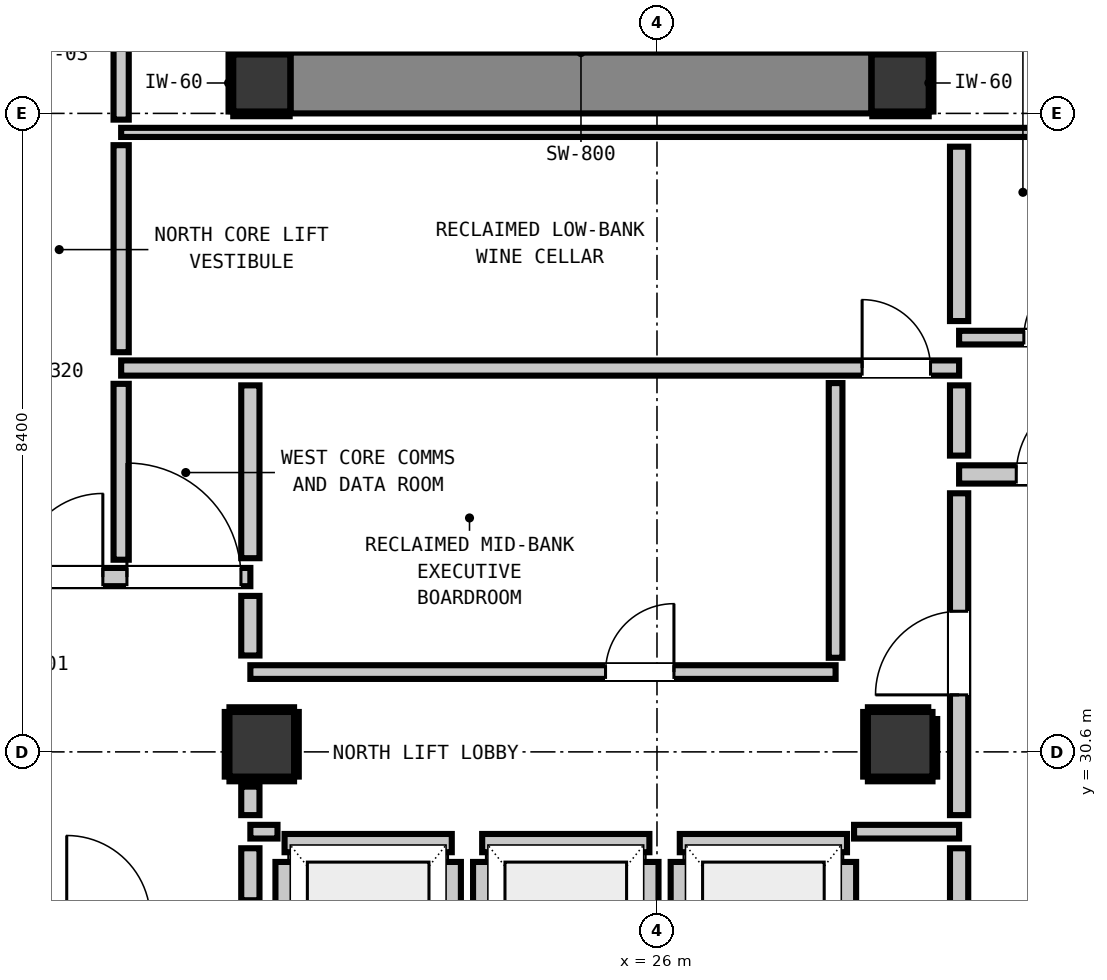
"""IFC4 building model, lengths in metres.
Left out: names, types, materials, properties, quantities, classifications, styles, units other than length and angle.
Written with IfcOpenShell. Run it as: python <this file> out.ifc"""

import sys

from ifc_helpers import new_model, si_unit, direction, frame, frame_2d, origin, origin_2d, place, context, subcontext, project, spatial, rectangle, extrude, element, fill, save


model = new_model("IFC4")
c1 = context("Model", 3, precision=1e-05, world=origin(), true_north=direction((0.0, 1.0)))
c2 = subcontext(c1, "Body", "Model", "MODEL_VIEW")
j1 = project(units=[si_unit("LENGTHUNIT", "METRE"), si_unit("PLANEANGLEUNIT", "RADIAN")], contexts=[c1])
p1 = place(None, origin())
s1 = spatial("IfcSite", under=j1, at=p1, CompositionType="ELEMENT")
p2 = place(p1, origin())
s2 = spatial("IfcBuilding", under=s1, at=p2, CompositionType="ELEMENT")
p3 = place(p2, frame((0.0, 0.0, 210.08)))
s3 = spatial("IfcBuildingStorey", under=s2, at=p3, CompositionType="ELEMENT", Elevation=210.08)
for number, where, z_axis, x_axis in (
    (1, (20.8, 39.4, 0.0), (0.0, 0.0, 1.0), (1.0, 0.0, 0.0)),
    (2, (29.2, 39.4, 0.0), (0.0, 0.0, 1.0), (1.0, 0.0, 0.0)),
):
    element("IfcColumn", number, at=place(p3, frame(where, z_axis=z_axis, x_axis=x_axis)), inside=s3, PredefinedType="COLUMN", context=c2, shape_type="SweptSolid", body=[
        extrude(rectangle(XDim=0.75, YDim=0.75, at=origin_2d()), origin(), (0.0, 0.0, 1.0), 3.32),
    ])
p4 = place(p3, frame((21.18, 39.4, 0.0), z_axis=(0.0, 0.0, 1.0), x_axis=(1.0, 0.0, 0.0)))
e3 = element("IfcWall", 3, at=p4, inside=s3, PredefinedType="SHEAR", context=c2, shape_type="SweptSolid", body=[
    extrude(rectangle(XDim=7.64, YDim=0.8, at=frame_2d((3.82, 0.0))), origin(), (0.0, 0.0, 1.0), 3.32),
])
for number, where, z_axis, x_axis in (
    (4, (20.8, 30.7, 0.0), (0.0, 0.0, 1.0), (1.0, 0.0, 0.0)),
    (5, (29.2, 30.7, 0.0), (0.0, 0.0, 1.0), (1.0, 0.0, 0.0)),
):
    element("IfcColumn", number, at=place(p3, frame(where, z_axis=z_axis, x_axis=x_axis)), inside=s3, PredefinedType="COLUMN", context=c2, shape_type="SweptSolid", body=[
        extrude(rectangle(XDim=0.85, YDim=0.85, at=origin_2d()), origin(), (0.0, 0.0, 1.0), 3.32),
    ])
p5 = place(p3, frame((21.1, 29.4, 0.0), z_axis=(0.0, 0.0, 1.0), x_axis=(1.0, 0.0, 0.0)))
e6 = element("IfcWall", 6, at=p5, inside=s3, PredefinedType="PARTITIONING", context=c2, shape_type="SweptSolid", body=[
    extrude(rectangle(XDim=2.2, YDim=0.24, at=frame_2d((1.1, 0.0))), origin(), (0.0, 0.0, 1.0), 3.1),
])
p6 = place(p3, frame((21.1, 27.048, 0.0), z_axis=(0.0, 0.0, 1.0), x_axis=(0.0, 1.0, 0.0)))
e7 = element("IfcWall", 7, at=p6, inside=s3, PredefinedType="PARTITIONING", context=c2, shape_type="SweptSolid", body=[
    extrude(rectangle(XDim=2.104, YDim=0.24, at=frame_2d((1.052, 0.0))), origin(), (0.0, 0.0, 1.0), 2.335),
])
p7 = place(p3, frame((23.3, 27.048, 0.0), z_axis=(0.0, 0.0, 1.0), x_axis=(0.0, 1.0, 0.0)))
e8 = element("IfcWall", 8, at=p7, inside=s3, PredefinedType="PARTITIONING", context=c2, shape_type="SweptSolid", body=[
    extrude(rectangle(XDim=2.104, YDim=0.24, at=frame_2d((1.052, 0.0))), origin(), (0.0, 0.0, 1.0), 3.1),
])
p8 = place(p3, frame((23.7, 29.4, 0.0), z_axis=(0.0, 0.0, 1.0), x_axis=(1.0, 0.0, 0.0)))
e9 = element("IfcWall", 9, at=p8, inside=s3, PredefinedType="PARTITIONING", context=c2, shape_type="SweptSolid", body=[
    extrude(rectangle(XDim=2.2, YDim=0.24, at=frame_2d((1.1, 0.0))), origin(), (0.0, 0.0, 1.0), 3.1),
])
for number, where, z_axis, x_axis in (
    (10, (23.7, 27.048, 0.0), (0.0, 0.0, 1.0), (0.0, 1.0, 0.0)),
    (11, (25.9, 27.048, 0.0), (0.0, 0.0, 1.0), (0.0, 1.0, 0.0)),
):
    element("IfcWall", number, at=place(p3, frame(where, z_axis=z_axis, x_axis=x_axis)), inside=s3, PredefinedType="PARTITIONING", context=c2, shape_type="SweptSolid", body=[
        extrude(rectangle(XDim=2.104, YDim=0.24, at=frame_2d((1.052, 0.0))), origin(), (0.0, 0.0, 1.0), 3.1),
    ])
p9 = place(p3, frame((26.3, 29.4, 0.0), z_axis=(0.0, 0.0, 1.0), x_axis=(1.0, 0.0, 0.0)))
e12 = element("IfcWall", 12, at=p9, inside=s3, PredefinedType="PARTITIONING", context=c2, shape_type="SweptSolid", body=[
    extrude(rectangle(XDim=2.2, YDim=0.24, at=frame_2d((1.1, 0.0))), origin(), (0.0, 0.0, 1.0), 3.1),
])
p10 = place(p3, frame((26.3, 27.048, 0.0), z_axis=(0.0, 0.0, 1.0), x_axis=(0.0, 1.0, 0.0)))
e13 = element("IfcWall", 13, at=p10, inside=s3, PredefinedType="PARTITIONING", context=c2, shape_type="SweptSolid", body=[
    extrude(rectangle(XDim=2.104, YDim=0.24, at=frame_2d((1.052, 0.0))), origin(), (0.0, 0.0, 1.0), 3.1),
])
p11 = place(p3, frame((28.5, 27.33, 0.0), z_axis=(0.0, 0.0, 1.0), x_axis=(0.0, 1.0, 0.0)))
e14 = element("IfcWall", 14, at=p11, inside=s3, PredefinedType="PARTITIONING", context=c2, shape_type="SweptSolid", body=[
    extrude(rectangle(XDim=1.822, YDim=0.24, at=frame_2d((0.911, 0.0))), origin(), (0.0, 0.0, 1.0), 3.1),
])
p12 = place(p3, frame((17.45, 32.9, 0.0), z_axis=(0.0, 0.0, 1.0), x_axis=(1.0, 0.0, 0.0)))
e15 = element("IfcWall", 15, at=p12, inside=s3, PredefinedType="PARTITIONING", context=c2, shape_type="SweptSolid", body=[
    extrude(rectangle(XDim=3.2, YDim=0.24, at=frame_2d((1.6, 0.0))), origin(), (0.0, 0.0, 1.0), 3.1),
])
p13 = place(p12, frame((0.159, 0.0, 0.0)))
e16 = element("IfcOpeningElement", 16, at=p13, cuts=e15, PredefinedType="OPENING", context=c2, shape_type="SweptSolid", body=[
    extrude(rectangle(XDim=1.1, YDim=2.15, at=frame_2d((0.55, 1.075))), frame((0.0, 0.13, 0.0), z_axis=(0.0, -1.0, 0.0), x_axis=(1.0, 0.0, 0.0)), (0.0, 0.0, 1.0), 0.26),
])
p14 = place(p12, frame((1.576, 0.0, 0.0)))
e17 = element("IfcOpeningElement", 17, at=p14, cuts=e15, PredefinedType="OPENING", context=c2, shape_type="SweptSolid", body=[
    extrude(rectangle(XDim=1.5, YDim=2.15, at=frame_2d((0.75, 1.075))), frame((0.0, 0.13, 0.0), z_axis=(0.0, -1.0, 0.0), x_axis=(1.0, 0.0, 0.0)), (0.0, 0.0, 1.0), 0.26),
])
p15 = place(p3, frame((29.975, 34.25, 0.0), z_axis=(0.0, 0.0, 1.0), x_axis=(1.0, 0.0, 0.0)))
e18 = element("IfcWall", 18, at=p15, inside=s3, PredefinedType="PARTITIONING", context=c2, shape_type="SweptSolid", body=[
    extrude(rectangle(XDim=2.475, YDim=0.24, at=frame_2d((1.237, 0.0))), origin(), (0.0, 0.0, 1.0), 3.1),
])
p16 = place(p15, frame((0.752, 0.0, 0.0)))
e19 = element("IfcOpeningElement", 19, at=p16, cuts=e18, PredefinedType="OPENING", context=c2, shape_type="SweptSolid", body=[
    extrude(rectangle(XDim=1.1, YDim=2.15, at=frame_2d((0.55, 1.075))), frame((0.0, 0.13, 0.0), z_axis=(0.0, -1.0, 0.0), x_axis=(1.0, 0.0, 0.0)), (0.0, 0.0, 1.0), 0.26),
])
p17 = place(p3, frame((18.95, 35.65, 0.0), z_axis=(0.0, 0.0, 1.0), x_axis=(1.0, 0.0, 0.0)))
e20 = element("IfcWall", 20, at=p17, inside=s3, PredefinedType="PARTITIONING", context=c2, shape_type="SweptSolid", body=[
    extrude(rectangle(XDim=11.025, YDim=0.2, at=frame_2d((5.513, 0.0))), origin(), (0.0, 0.0, 1.0), 3.1),
])
p18 = place(p17, frame((9.749, 0.0, 0.0)))
e21 = element("IfcOpeningElement", 21, at=p18, cuts=e20, PredefinedType="OPENING", context=c2, shape_type="SweptSolid", body=[
    extrude(rectangle(XDim=0.9, YDim=2.1, at=frame_2d((0.45, 1.05))), frame((0.0, 0.11, 0.0), z_axis=(0.0, -1.0, 0.0), x_axis=(1.0, 0.0, 0.0)), (0.0, 0.0, 1.0), 0.22),
])
p19 = place(p3, frame((20.65, 29.55, 0.0), z_axis=(0.0, 0.0, 1.0), x_axis=(1.0, 0.0, 0.0)))
e22 = element("IfcWall", 22, at=p19, inside=s3, PredefinedType="PARTITIONING", context=c2, shape_type="SweptSolid", body=[
    extrude(rectangle(XDim=0.357, YDim=0.18, at=frame_2d((0.179, 0.0))), origin(), (0.0, 0.0, 1.0), 3.1),
])
p20 = place(p3, frame((28.593, 29.55, 0.0), z_axis=(0.0, 0.0, 1.0), x_axis=(1.0, 0.0, 0.0)))
e23 = element("IfcWall", 23, at=p20, inside=s3, PredefinedType="PARTITIONING", context=c2, shape_type="SweptSolid", body=[
    extrude(rectangle(XDim=1.382, YDim=0.18, at=frame_2d((0.691, 0.0))), origin(), (0.0, 0.0, 1.0), 3.1),
])
p21 = place(p3, frame((20.65, 31.65, 0.0), z_axis=(0.0, 0.0, 1.0), x_axis=(1.0, 0.0, 0.0)))
e24 = element("IfcWall", 24, at=p21, inside=s3, PredefinedType="PARTITIONING", context=c2, shape_type="SweptSolid", body=[
    extrude(rectangle(XDim=7.7, YDim=0.18, at=frame_2d((3.85, 0.0))), origin(), (0.0, 0.0, 1.0), 3.1),
])
p22 = place(p21, frame((4.673, 0.0, 0.0)))
e25 = element("IfcOpeningElement", 25, at=p22, cuts=e24, PredefinedType="OPENING", context=c2, shape_type="SweptSolid", body=[
    extrude(rectangle(XDim=0.9, YDim=2.1, at=frame_2d((0.45, 1.05))), frame((0.0, 0.1, 0.0), z_axis=(0.0, -1.0, 0.0), x_axis=(1.0, 0.0, 0.0)), (0.0, 0.0, 1.0), 0.2),
])
p23 = place(p3, frame((29.975, 36.05, 0.0), z_axis=(0.0, 0.0, 1.0), x_axis=(1.0, 0.0, 0.0)))
e26 = element("IfcWall", 26, at=p23, inside=s3, PredefinedType="PARTITIONING", context=c2, shape_type="SweptSolid", body=[
    extrude(rectangle(XDim=2.505, YDim=0.18, at=frame_2d((1.252, 0.0))), origin(), (0.0, 0.0, 1.0), 3.1),
])
p24 = place(p23, frame((0.852, 0.0, 0.0)))
e27 = element("IfcOpeningElement", 27, at=p24, cuts=e26, PredefinedType="OPENING", context=c2, shape_type="SweptSolid", body=[
    extrude(rectangle(XDim=0.9, YDim=2.1, at=frame_2d((0.45, 1.05))), frame((0.0, 0.1, 0.0), z_axis=(0.0, -1.0, 0.0), x_axis=(1.0, 0.0, 0.0)), (0.0, 0.0, 1.0), 0.2),
])
p25 = place(p3, frame((18.95, 38.75, 0.0), z_axis=(0.0, 0.0, 1.0), x_axis=(1.0, 0.0, 0.0)))
e28 = element("IfcWall", 28, at=p25, inside=s3, PredefinedType="PARTITIONING", context=c2, shape_type="SweptSolid", body=[
    extrude(rectangle(XDim=13.56, YDim=0.12, at=frame_2d((6.78, 0.0))), origin(), (0.0, 0.0, 1.0), 3.1),
])
p26 = place(p3, frame((20.65, 28.648, 0.0), z_axis=(0.0, 0.0, 1.0), x_axis=(0.0, 1.0, 0.0)))
e29 = element("IfcWall", 29, at=p26, inside=s3, PredefinedType="PARTITIONING", context=c2, shape_type="SweptSolid", body=[
    extrude(rectangle(XDim=0.684, YDim=0.24, at=frame_2d((0.342, 0.0))), origin(), (0.0, 0.0, 1.0), 2.335),
])
p27 = place(p3, frame((20.65, 29.768, 0.0), z_axis=(0.0, 0.0, 1.0), x_axis=(0.0, 1.0, 0.0)))
e30 = element("IfcWall", 30, at=p27, inside=s3, PredefinedType="PARTITIONING", context=c2, shape_type="SweptSolid", body=[
    extrude(rectangle(XDim=0.375, YDim=0.24, at=frame_2d((0.188, 0.0))), origin(), (0.0, 0.0, 1.0), 2.335),
])
p28 = place(p3, frame((20.65, 31.868, 0.0), z_axis=(0.0, 0.0, 1.0), x_axis=(0.0, 1.0, 0.0)))
e31 = element("IfcWall", 31, at=p28, inside=s3, PredefinedType="PARTITIONING", context=c2, shape_type="SweptSolid", body=[
    extrude(rectangle(XDim=0.784, YDim=0.24, at=frame_2d((0.392, 0.0))), origin(), (0.0, 0.0, 1.0), 2.335),
])
p29 = place(p3, frame((20.65, 33.148, 0.0), z_axis=(0.0, 0.0, 1.0), x_axis=(0.0, 1.0, 0.0)))
e32 = element("IfcWall", 32, at=p29, inside=s3, PredefinedType="PARTITIONING", context=c2, shape_type="SweptSolid", body=[
    extrude(rectangle(XDim=2.274, YDim=0.24, at=frame_2d((1.137, 0.0))), origin(), (0.0, 0.0, 1.0), 2.335),
])
p30 = place(p3, frame((29.975, 25.648, 0.0), z_axis=(0.0, 0.0, 1.0), x_axis=(0.0, 1.0, 0.0)))
e33 = element("IfcWall", 33, at=p30, inside=s3, PredefinedType="PARTITIONING", context=c2, shape_type="SweptSolid", body=[
    extrude(rectangle(XDim=3.684, YDim=0.24, at=frame_2d((1.842, 0.0))), origin(), (0.0, 0.0, 1.0), 3.1),
])
p31 = place(p3, frame((29.975, 29.768, 0.0), z_axis=(0.0, 0.0, 1.0), x_axis=(0.0, 1.0, 0.0)))
e34 = element("IfcWall", 34, at=p31, inside=s3, PredefinedType="PARTITIONING", context=c2, shape_type="SweptSolid", body=[
    extrude(rectangle(XDim=4.234, YDim=0.24, at=frame_2d((2.117, 0.0))), origin(), (0.0, 0.0, 1.0), 3.1),
])
p32 = place(p31, frame((1.582, 0.0, 0.0)))
e35 = element("IfcOpeningElement", 35, at=p32, cuts=e34, PredefinedType="OPENING", context=c2, shape_type="SweptSolid", body=[
    extrude(rectangle(XDim=1.1, YDim=2.15, at=frame_2d((0.55, 1.075))), frame((0.0, 0.13, 0.0), z_axis=(0.0, -1.0, 0.0), x_axis=(1.0, 0.0, 0.0)), (0.0, 0.0, 1.0), 0.26),
])
p33 = place(p3, frame((29.975, 34.498, 0.0), z_axis=(0.0, 0.0, 1.0), x_axis=(0.0, 1.0, 0.0)))
e36 = element("IfcWall", 36, at=p33, inside=s3, PredefinedType="PARTITIONING", context=c2, shape_type="SweptSolid", body=[
    extrude(rectangle(XDim=0.924, YDim=0.24, at=frame_2d((0.462, 0.0))), origin(), (0.0, 0.0, 1.0), 3.1),
])
p34 = place(p3, frame((29.975, 36.268, 0.0), z_axis=(0.0, 0.0, 1.0), x_axis=(0.0, 1.0, 0.0)))
e37 = element("IfcWall", 37, at=p34, inside=s3, PredefinedType="PARTITIONING", context=c2, shape_type="SweptSolid", body=[
    extrude(rectangle(XDim=2.294, YDim=0.24, at=frame_2d((1.147, 0.0))), origin(), (0.0, 0.0, 1.0), 3.1),
])
p35 = place(p3, frame((18.95, 33.128, 0.0), z_axis=(0.0, 0.0, 1.0), x_axis=(0.0, 1.0, 0.0)))
e38 = element("IfcWall", 38, at=p35, inside=s3, PredefinedType="PARTITIONING", context=c2, shape_type="SweptSolid", body=[
    extrude(rectangle(XDim=2.314, YDim=0.2, at=frame_2d((1.157, 0.0))), origin(), (0.0, 0.0, 1.0), 3.1),
])
p36 = place(p3, frame((18.95, 35.858, 0.0), z_axis=(0.0, 0.0, 1.0), x_axis=(0.0, 1.0, 0.0)))
e39 = element("IfcWall", 39, at=p36, inside=s3, PredefinedType="PARTITIONING", context=c2, shape_type="SweptSolid", body=[
    extrude(rectangle(XDim=2.724, YDim=0.2, at=frame_2d((1.362, 0.0))), origin(), (0.0, 0.0, 1.0), 3.1),
])
p37 = place(p3, frame((18.95, 38.918, 0.0), z_axis=(0.0, 0.0, 1.0), x_axis=(0.0, 1.0, 0.0)))
e40 = element("IfcWall", 40, at=p37, inside=s3, PredefinedType="PARTITIONING", context=c2, shape_type="SweptSolid", body=[
    extrude(rectangle(XDim=1.134, YDim=0.2, at=frame_2d((0.567, 0.0))), origin(), (0.0, 0.0, 1.0), 3.1),
])
p38 = place(p3, frame((28.35, 31.838, 0.0), z_axis=(0.0, 0.0, 1.0), x_axis=(0.0, 1.0, 0.0)))
e41 = element("IfcWall", 41, at=p38, inside=s3, PredefinedType="PARTITIONING", context=c2, shape_type="SweptSolid", body=[
    extrude(rectangle(XDim=3.614, YDim=0.18, at=frame_2d((1.807, 0.0))), origin(), (0.0, 0.0, 1.0), 3.1),
])
for number, where, z_axis, x_axis in (
    (42, (20.425, 38.993, 0.0), (0.0, 0.0, 1.0), (1.0, 0.0, 0.0)),
    (43, (20.425, 39.807, 0.0), (0.0, 0.0, 1.0), (1.0, 0.0, 0.0)),
):
    element("IfcWall", number, at=place(p3, frame(where, z_axis=z_axis, x_axis=x_axis)), inside=s3, PredefinedType="PARTITIONING", context=c2, shape_type="SweptSolid", body=[
        extrude(rectangle(XDim=0.742, YDim=0.06, at=frame_2d((0.371, 0.0))), origin(), (0.0, 0.0, 1.0), 1.45),
    ])
p39 = place(p3, frame((20.393, 39.025, 0.0), z_axis=(0.0, 0.0, 1.0), x_axis=(0.0, 1.0, 0.0)))
e44 = element("IfcWall", 44, at=p39, inside=s3, PredefinedType="PARTITIONING", context=c2, shape_type="SweptSolid", body=[
    extrude(rectangle(XDim=0.75, YDim=0.06, at=frame_2d((0.375, 0.0))), origin(), (0.0, 0.0, 1.0), 1.45),
])
for number, where, z_axis, x_axis in (
    (45, (28.833, 38.993, 0.0), (0.0, 0.0, 1.0), (1.0, 0.0, 0.0)),
    (46, (28.833, 39.807, 0.0), (0.0, 0.0, 1.0), (1.0, 0.0, 0.0)),
):
    element("IfcWall", number, at=place(p3, frame(where, z_axis=z_axis, x_axis=x_axis)), inside=s3, PredefinedType="PARTITIONING", context=c2, shape_type="SweptSolid", body=[
        extrude(rectangle(XDim=0.742, YDim=0.06, at=frame_2d((0.371, 0.0))), origin(), (0.0, 0.0, 1.0), 1.45),
    ])
p40 = place(p3, frame((29.607, 39.025, 0.0), z_axis=(0.0, 0.0, 1.0), x_axis=(0.0, 1.0, 0.0)))
e47 = element("IfcWall", 47, at=p40, inside=s3, PredefinedType="PARTITIONING", context=c2, shape_type="SweptSolid", body=[
    extrude(rectangle(XDim=0.75, YDim=0.06, at=frame_2d((0.375, 0.0))), origin(), (0.0, 0.0, 1.0), 1.45),
])
for number, where, z_axis, x_axis in (
    (48, (20.375, 30.243, 0.0), (0.0, 0.0, 1.0), (1.0, 0.0, 0.0)),
    (49, (20.375, 31.157, 0.0), (0.0, 0.0, 1.0), (1.0, 0.0, 0.0)),
    (50, (20.343, 30.275, 0.0), (0.0, 0.0, 1.0), (0.0, 1.0, 0.0)),
    (51, (21.257, 30.275, 0.0), (0.0, 0.0, 1.0), (0.0, 1.0, 0.0)),
    (52, (28.775, 30.243, 0.0), (0.0, 0.0, 1.0), (1.0, 0.0, 0.0)),
):
    element("IfcWall", number, at=place(p3, frame(where, z_axis=z_axis, x_axis=x_axis)), inside=s3, PredefinedType="PARTITIONING", context=c2, shape_type="SweptSolid", body=[
        extrude(rectangle(XDim=0.85, YDim=0.06, at=frame_2d((0.425, 0.0))), origin(), (0.0, 0.0, 1.0), 1.45),
    ])
p41 = place(p3, frame((28.775, 31.157, 0.0), z_axis=(0.0, 0.0, 1.0), x_axis=(1.0, 0.0, 0.0)))
e53 = element("IfcWall", 53, at=p41, inside=s3, PredefinedType="PARTITIONING", context=c2, shape_type="SweptSolid", body=[
    extrude(rectangle(XDim=0.794, YDim=0.06, at=frame_2d((0.397, 0.0))), origin(), (0.0, 0.0, 1.0), 1.45),
])
p42 = place(p3, frame((28.743, 30.275, 0.0), z_axis=(0.0, 0.0, 1.0), x_axis=(0.0, 1.0, 0.0)))
e54 = element("IfcWall", 54, at=p42, inside=s3, PredefinedType="PARTITIONING", context=c2, shape_type="SweptSolid", body=[
    extrude(rectangle(XDim=0.85, YDim=0.06, at=frame_2d((0.425, 0.0))), origin(), (0.0, 0.0, 1.0), 1.45),
])
p43 = place(p3, frame((29.657, 30.275, 0.0), z_axis=(0.0, 0.0, 1.0), x_axis=(0.0, 1.0, 0.0)))
e55 = element("IfcWall", 55, at=p43, inside=s3, PredefinedType="PARTITIONING", context=c2, shape_type="SweptSolid", body=[
    extrude(rectangle(XDim=0.757, YDim=0.06, at=frame_2d((0.378, 0.0))), origin(), (0.0, 0.0, 1.0), 1.45),
])
p44 = place(p13, origin())
e56 = element("IfcDoor", 56, at=p44, inside=s3, OperationType="SINGLE_SWING_RIGHT", PredefinedType="DOOR", context=c2, shape_type="SweptSolid", body=[
    extrude(rectangle(XDim=1.1, YDim=2.15, at=frame_2d((0.55, 1.075))), frame((0.0, 0.025, 0.0), z_axis=(0.0, -1.0, 0.0), x_axis=(1.0, 0.0, 0.0)), (0.0, 0.0, 1.0), 0.05),
])
fill(e16, e56)
p45 = place(p32, origin())
e57 = element("IfcDoor", 57, at=p45, inside=s3, OperationType="SINGLE_SWING_LEFT", PredefinedType="DOOR", context=c2, shape_type="SweptSolid", body=[
    extrude(rectangle(XDim=1.1, YDim=2.15, at=frame_2d((0.55, 1.075))), frame((0.0, 0.025, 0.0), z_axis=(0.0, -1.0, 0.0), x_axis=(1.0, 0.0, 0.0)), (0.0, 0.0, 1.0), 0.05),
])
fill(e35, e57)
p46 = place(p16, origin())
e58 = element("IfcDoor", 58, at=p46, inside=s3, OperationType="SINGLE_SWING_RIGHT", PredefinedType="DOOR", context=c2, shape_type="SweptSolid", body=[
    extrude(rectangle(XDim=1.1, YDim=2.15, at=frame_2d((0.55, 1.075))), frame((0.0, 0.025, 0.0), z_axis=(0.0, -1.0, 0.0), x_axis=(1.0, 0.0, 0.0)), (0.0, 0.0, 1.0), 0.05),
])
fill(e19, e58)
p47 = place(p14, origin())
e59 = element("IfcDoor", 59, at=p47, inside=s3, OperationType="SINGLE_SWING_LEFT", PredefinedType="DOOR", context=c2, shape_type="SweptSolid", body=[
    extrude(rectangle(XDim=1.5, YDim=2.15, at=frame_2d((0.75, 1.075))), frame((0.0, 0.025, 0.0), z_axis=(0.0, -1.0, 0.0), x_axis=(1.0, 0.0, 0.0)), (0.0, 0.0, 1.0), 0.05),
])
fill(e17, e59)
p48 = place(p24, origin())
e60 = element("IfcDoor", 60, at=p48, inside=s3, OperationType="SINGLE_SWING_RIGHT", PredefinedType="DOOR", context=c2, shape_type="SweptSolid", body=[
    extrude(rectangle(XDim=0.9, YDim=2.1, at=frame_2d((0.45, 1.05))), frame((0.0, 0.025, 0.0), z_axis=(0.0, -1.0, 0.0), x_axis=(1.0, 0.0, 0.0)), (0.0, 0.0, 1.0), 0.05),
])
fill(e27, e60)
p49 = place(p18, origin())
e61 = element("IfcDoor", 61, at=p49, inside=s3, OperationType="SINGLE_SWING_LEFT", PredefinedType="DOOR", context=c2, shape_type="SweptSolid", body=[
    extrude(rectangle(XDim=0.9, YDim=2.1, at=frame_2d((0.45, 1.05))), frame((0.0, 0.025, 0.0), z_axis=(0.0, -1.0, 0.0), x_axis=(1.0, 0.0, 0.0)), (0.0, 0.0, 1.0), 0.05),
])
fill(e21, e61)
p50 = place(p22, origin())
e62 = element("IfcDoor", 62, at=p50, inside=s3, OperationType="SINGLE_SWING_RIGHT", PredefinedType="DOOR", context=c2, shape_type="SweptSolid", body=[
    extrude(rectangle(XDim=0.9, YDim=2.1, at=frame_2d((0.45, 1.05))), frame((0.0, 0.025, 0.0), z_axis=(0.0, -1.0, 0.0), x_axis=(1.0, 0.0, 0.0)), (0.0, 0.0, 1.0), 0.05),
])
fill(e25, e62)
save(model, sys.argv[1])
